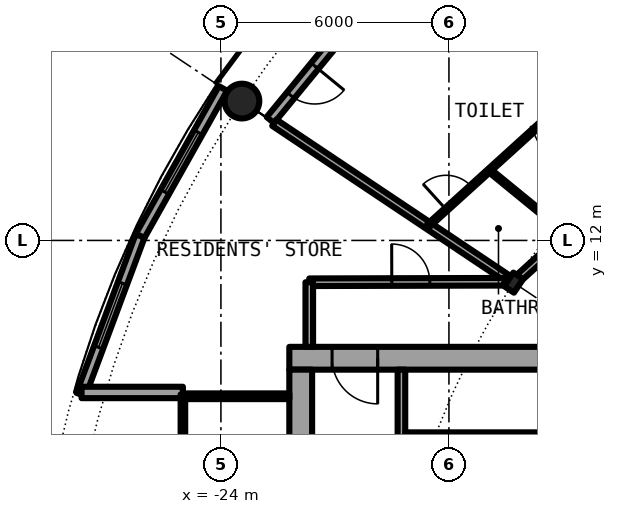
"""IFC4 building model, lengths in metres.
Left out: names, types, materials, properties, quantities, classifications, styles, units other than length and angle.
Written with IfcOpenShell. Run it as: python <this file> out.ifc"""

import sys

from ifc_helpers import new_model, si_unit, direction, frame, frame_2d, origin, origin_2d, place, context, subcontext, project, spatial, rectangle, hollow_circle, i_section, extrude, element, fill, save


model = new_model("IFC4")
c1 = context("Model", 3, precision=1e-05, world=origin(), true_north=direction((0.0, 1.0)))
c2 = subcontext(c1, "Body", "Model", "MODEL_VIEW")
j1 = project(units=[si_unit("LENGTHUNIT", "METRE"), si_unit("PLANEANGLEUNIT", "RADIAN")], contexts=[c1])
p1 = place(None, origin())
s1 = spatial("IfcSite", under=j1, at=p1, CompositionType="ELEMENT")
p2 = place(p1, origin())
s2 = spatial("IfcBuilding", under=s1, at=p2, CompositionType="ELEMENT")
p3 = place(p2, frame((0.0, 0.0, 129.95)))
s3 = spatial("IfcBuildingStorey", under=s2, at=p3, CompositionType="ELEMENT", Elevation=129.95)
p4 = place(p3, frame((-23.448, 15.667, 0.0), z_axis=(0.0, 0.0, 1.0), x_axis=(1.0, 0.0, 0.0)))
e1 = element("IfcColumn", 1, at=p4, inside=s3, PredefinedType="COLUMN", context=c2, shape_type="SweptSolid", body=[
    extrude(hollow_circle(Radius=0.457, WallThickness=0.04, at=origin_2d()), origin(), (0.0, 0.0, 1.0), 3.05),
])
p5 = place(p3, frame((-16.297, 10.889, 0.0), z_axis=(0.0, 0.0, 1.0), x_axis=(-0.831469612303, 0.55557023302, 0.0)))
e2 = element("IfcColumn", 2, at=p5, inside=s3, PredefinedType="COLUMN", context=c2, shape_type="SweptSolid", body=[
    extrude(i_section(OverallWidth=0.307, OverallDepth=0.432, WebThickness=0.021, FlangeThickness=0.04, FilletRadius=0.027, at=origin_2d()), origin(), (0.0, 0.0, 1.0), 3.05),
])
p6 = place(p3, frame((-19.304, 19.304, 0.0), z_axis=(0.0, 0.0, 1.0), x_axis=(-0.634382322723, -0.773019449054, 0.0)))
e3 = element("IfcWall", 3, at=p6, inside=s3, PredefinedType="SOLIDWALL", context=c2, shape_type="SweptSolid", body=[
    extrude(rectangle(XDim=5.352, YDim=0.25, at=frame_2d((2.676, 0.0))), origin(), (0.0, 0.0, 1.0), 2.7),
])
p7 = place(p6, frame((0.441, 0.0, 0.3)))
e4 = element("IfcOpeningElement", 4, at=p7, cuts=e3, PredefinedType="OPENING", context=c2, shape_type="SweptSolid", body=[
    extrude(rectangle(XDim=1.8, YDim=2.1, at=frame_2d((0.9, 1.05))), frame((0.0, 0.135, 0.0), z_axis=(0.0, -1.0, 0.0), x_axis=(1.0, 0.0, 0.0)), (0.0, 0.0, 1.0), 0.27),
])
p8 = place(p6, frame((3.51, 0.0, 0.0)))
e5 = element("IfcOpeningElement", 5, at=p8, cuts=e3, PredefinedType="OPENING", context=c2, shape_type="SweptSolid", body=[
    extrude(rectangle(XDim=1.0, YDim=2.2, at=frame_2d((0.5, 1.1))), frame((0.0, 0.135, 0.0), z_axis=(0.0, -1.0, 0.0), x_axis=(1.0, 0.0, 0.0)), (0.0, 0.0, 1.0), 0.27),
])
p9 = place(p3, frame((-23.946, 16.0, 0.0), z_axis=(0.0, 0.0, 1.0), x_axis=(-0.489696356642, -0.871893042919, 0.0)))
e6 = element("IfcWall", 6, at=p9, inside=s3, PredefinedType="SOLIDWALL", context=c2, shape_type="SweptSolid", body=[
    extrude(rectangle(XDim=4.454, YDim=0.25, at=frame_2d((2.227, 0.0))), origin(), (0.0, 0.0, 1.0), 2.7),
])
p10 = place(p9, frame((1.327, 0.0, 0.3)))
e7 = element("IfcOpeningElement", 7, at=p10, cuts=e6, PredefinedType="OPENING", context=c2, shape_type="SweptSolid", body=[
    extrude(rectangle(XDim=1.8, YDim=2.1, at=frame_2d((0.9, 1.05))), frame((0.0, 0.135, 0.0), z_axis=(0.0, -1.0, 0.0), x_axis=(1.0, 0.0, 0.0)), (0.0, 0.0, 1.0), 0.27),
])
p11 = place(p3, frame((-26.127, 12.117, 0.0), z_axis=(0.0, 0.0, 1.0), x_axis=(-0.349247811493, -0.937030397675, 0.0)))
e8 = element("IfcWall", 8, at=p11, inside=s3, PredefinedType="SOLIDWALL", context=c2, shape_type="SweptSolid", body=[
    extrude(rectangle(XDim=4.452, YDim=0.25, at=frame_2d((2.226, 0.0))), origin(), (0.0, 0.0, 1.0), 2.7),
])
p12 = place(p11, frame((1.327, 0.0, 0.3)))
e9 = element("IfcOpeningElement", 9, at=p12, cuts=e8, PredefinedType="OPENING", context=c2, shape_type="SweptSolid", body=[
    extrude(rectangle(XDim=1.8, YDim=2.1, at=frame_2d((0.9, 1.05))), frame((0.0, 0.135, 0.0), z_axis=(0.0, -1.0, 0.0), x_axis=(1.0, 0.0, 0.0)), (0.0, 0.0, 1.0), 0.27),
])
p13 = place(p3, frame((-25.0, 8.0, 0.0), z_axis=(0.0, 0.0, 1.0), x_axis=(-1.0, 0.0, 0.0)))
e10 = element("IfcWall", 10, at=p13, inside=s3, PredefinedType="SOLIDWALL", context=c2, shape_type="SweptSolid", body=[
    extrude(rectangle(XDim=2.667, YDim=0.3, at=frame_2d((1.333, 0.0))), origin(), (0.0, 0.0, 1.0), 2.7),
])
p14 = place(p3, frame((-8.4, 8.9, 0.0), z_axis=(0.0, 0.0, 1.0), x_axis=(-1.0, 0.0, 0.0)))
e11 = element("IfcWall", 11, at=p14, inside=s3, PredefinedType="SHEAR", context=c2, shape_type="SweptSolid", body=[
    extrude(rectangle(XDim=13.8, YDim=0.6, at=frame_2d((6.9, 0.0))), origin(), (0.0, 0.0, 1.0), 3.05),
])
p15 = place(p14, frame((11.475, 0.0, 0.0)))
e12 = element("IfcOpeningElement", 12, at=p15, cuts=e11, PredefinedType="OPENING", context=c2, shape_type="SweptSolid", body=[
    extrude(rectangle(XDim=1.2, YDim=2.3, at=frame_2d((0.6, 1.15))), frame((0.0, 0.31, 0.0), z_axis=(0.0, -1.0, 0.0), x_axis=(1.0, 0.0, 0.0)), (0.0, 0.0, 1.0), 0.62),
])
p16 = place(p3, frame((-21.9, -8.6, 0.0), z_axis=(0.0, 0.0, 1.0), x_axis=(0.0, 1.0, 0.0)))
e13 = element("IfcWall", 13, at=p16, inside=s3, PredefinedType="SHEAR", context=c2, shape_type="SweptSolid", body=[
    extrude(rectangle(XDim=17.2, YDim=0.6, at=frame_2d((8.6, 0.0))), origin(), (0.0, 0.0, 1.0), 3.05),
])
p17 = place(p16, frame((7.7, 0.0, 0.0)))
e14 = element("IfcOpeningElement", 14, at=p17, cuts=e13, PredefinedType="OPENING", context=c2, shape_type="SweptSolid", body=[
    extrude(rectangle(XDim=1.8, YDim=2.3, at=frame_2d((0.9, 1.15))), frame((0.0, 0.31, 0.0), z_axis=(0.0, -1.0, 0.0), x_axis=(1.0, 0.0, 0.0)), (0.0, 0.0, 1.0), 0.62),
])
p18 = place(p3, frame((-19.25, 8.6, 0.0), z_axis=(0.0, 0.0, 1.0), x_axis=(0.0, -1.0, 0.0)))
e15 = element("IfcWall", 15, at=p18, inside=s3, PredefinedType="SOLIDWALL", context=c2, shape_type="SweptSolid", body=[
    extrude(rectangle(XDim=7.025, YDim=0.2, at=frame_2d((3.513, 0.0))), origin(), (0.0, 0.0, 1.0), 2.7),
])
p19 = place(p18, frame((2.35, 0.0, 0.0)))
e16 = element("IfcOpeningElement", 16, at=p19, cuts=e15, PredefinedType="OPENING", context=c2, shape_type="SweptSolid", body=[
    extrude(rectangle(XDim=1.1, YDim=2.3, at=frame_2d((0.55, 1.15))), frame((0.0, 0.11, 0.0), z_axis=(0.0, -1.0, 0.0), x_axis=(1.0, 0.0, 0.0)), (0.0, 0.0, 1.0), 0.22),
])
p20 = place(p3, frame((-15.45, 6.875, 0.0), z_axis=(0.0, 0.0, 1.0), x_axis=(-1.0, 0.0, 0.0)))
e17 = element("IfcWall", 17, at=p20, inside=s3, PredefinedType="PARTITIONING", context=c2, shape_type="SweptSolid", body=[
    extrude(rectangle(XDim=3.7, YDim=0.15, at=frame_2d((1.85, 0.0))), origin(), (0.0, 0.0, 1.0), 2.7),
])
p21 = place(p20, frame((1.4, 0.0, 0.0)))
e18 = element("IfcOpeningElement", 18, at=p21, cuts=e17, PredefinedType="OPENING", context=c2, shape_type="SweptSolid", body=[
    extrude(rectangle(XDim=0.9, YDim=2.3, at=frame_2d((0.45, 1.15))), frame((0.0, 0.085, 0.0), z_axis=(0.0, -1.0, 0.0), x_axis=(1.0, 0.0, 0.0)), (0.0, 0.0, 1.0), 0.17),
])
p22 = place(p3, frame((-22.2, 7.9, 0.0), z_axis=(0.0, 0.0, 1.0), x_axis=(-1.0, 0.0, 0.0)))
e19 = element("IfcWall", 19, at=p22, inside=s3, PredefinedType="PARTITIONING", context=c2, shape_type="SweptSolid", body=[
    extrude(rectangle(XDim=2.74, YDim=0.15, at=frame_2d((1.37, 0.0))), origin(), (0.0, 0.0, 1.0), 2.7),
])
p23 = place(p3, frame((-25.0, 7.95, 0.0), z_axis=(0.0, 0.0, 1.0), x_axis=(0.0, -1.0, 0.0)))
e20 = element("IfcWall", 20, at=p23, inside=s3, PredefinedType="PARTITIONING", context=c2, shape_type="SweptSolid", body=[
    extrude(rectangle(XDim=15.9, YDim=0.12, at=frame_2d((7.95, 0.0))), origin(), (0.0, 0.0, 1.0), 2.7),
])
p24 = place(p23, frame((0.95, 0.0, 0.1)))
e21 = element("IfcOpeningElement", 21, at=p24, cuts=e20, PredefinedType="OPENING", context=c2, shape_type="SweptSolid", body=[
    extrude(rectangle(XDim=14.0, YDim=2.35, at=frame_2d((7.0, 1.175))), frame((0.0, 0.07, 0.0), z_axis=(0.0, -1.0, 0.0), x_axis=(1.0, 0.0, 0.0)), (0.0, 0.0, 1.0), 0.14),
])
p25 = place(p3, frame((-22.595, 15.098, 0.0), z_axis=(0.0, 0.0, 1.0), x_axis=(0.831406593008, -0.555664536482, 0.0)))
e22 = element("IfcWall", 22, at=p25, inside=s3, PredefinedType="PARTITIONING", context=c2, shape_type="SweptSolid", body=[
    extrude(rectangle(XDim=7.358, YDim=0.2, at=frame_2d((3.679, 0.0))), origin(), (0.0, 0.0, 1.0), 2.7),
])
p26 = place(p3, frame((-17.221, 21.022, 0.0), z_axis=(0.0, 0.0, 1.0), x_axis=(0.633735868108, -0.773549513266, 0.0)))
e23 = element("IfcWall", 23, at=p26, inside=s3, PredefinedType="PARTITIONING", context=c2, shape_type="SweptSolid", body=[
    extrude(rectangle(XDim=8.139, YDim=0.1, at=frame_2d((4.069, 0.0))), origin(), (0.0, 0.0, 1.0), 2.7),
])
p27 = place(p26, frame((6.378, 0.0, 0.0)))
e24 = element("IfcOpeningElement", 24, at=p27, cuts=e23, PredefinedType="OPENING", context=c2, shape_type="SweptSolid", body=[
    extrude(rectangle(XDim=0.9, YDim=2.3, at=frame_2d((0.45, 1.15))), frame((0.0, 0.06, 0.0), z_axis=(0.0, -1.0, 0.0), x_axis=(1.0, 0.0, 0.0)), (0.0, 0.0, 1.0), 0.12),
])
p28 = place(p26, frame((2.308, 0.0, 0.0)))
e25 = element("IfcOpeningElement", 25, at=p28, cuts=e23, PredefinedType="OPENING", context=c2, shape_type="SweptSolid", body=[
    extrude(rectangle(XDim=0.9, YDim=2.3, at=frame_2d((0.45, 1.15))), frame((0.0, 0.06, 0.0), z_axis=(0.0, -1.0, 0.0), x_axis=(1.0, 0.0, 0.0)), (0.0, 0.0, 1.0), 0.12),
])
p29 = place(p3, frame((-16.936, 13.845, 0.0), z_axis=(0.0, 0.0, 1.0), x_axis=(0.774162545943, -0.632986850147, 0.0)))
e26 = element("IfcWall", 26, at=p29, inside=s3, PredefinedType="PARTITIONING", context=c2, shape_type="SweptSolid", body=[
    extrude(rectangle(XDim=2.649, YDim=0.1, at=frame_2d((1.325, 0.0))), origin(), (0.0, 0.0, 1.0), 2.7),
])
p30 = place(p3, frame((-21.675, 10.9, 0.0), z_axis=(0.0, 0.0, 1.0), x_axis=(0.99999670426, 0.002567385634, 0.0)))
e27 = element("IfcWall", 27, at=p30, inside=s3, PredefinedType="PARTITIONING", context=c2, shape_type="SweptSolid", body=[
    extrude(rectangle(XDim=5.135, YDim=0.2, at=frame_2d((2.567, 0.0))), origin(), (0.0, 0.0, 1.0), 2.7),
])
p31 = place(p30, frame((2.171, 0.0, 0.0)))
e28 = element("IfcOpeningElement", 28, at=p31, cuts=e27, PredefinedType="OPENING", context=c2, shape_type="SweptSolid", body=[
    extrude(rectangle(XDim=1.0, YDim=2.3, at=frame_2d((0.5, 1.15))), frame((0.0, 0.11, 0.0), z_axis=(0.0, -1.0, 0.0), x_axis=(1.0, 0.0, 0.0)), (0.0, 0.0, 1.0), 0.22),
])
p32 = place(p3, frame((-16.179, 10.995, 0.0), z_axis=(0.0, 0.0, 1.0), x_axis=(0.74092608219, 0.671586584687, 0.0)))
e29 = element("IfcWall", 29, at=p32, inside=s3, PredefinedType="PARTITIONING", context=c2, shape_type="SweptSolid", body=[
    extrude(rectangle(XDim=1.746, YDim=0.2, at=frame_2d((0.873, 0.0))), origin(), (0.0, 0.0, 1.0), 2.39),
])
p33 = place(p3, frame((-18.54, 12.392, 0.0), z_axis=(0.0, 0.0, 1.0), x_axis=(0.741109646243, 0.671384012504, 0.0)))
e30 = element("IfcWall", 30, at=p33, inside=s3, PredefinedType="PARTITIONING", context=c2, shape_type="SweptSolid", body=[
    extrude(rectangle(XDim=4.331, YDim=0.1, at=frame_2d((2.166, 0.0))), origin(), (0.0, 0.0, 1.0), 2.7),
])
p34 = place(p33, frame((0.629, 0.0, 0.0)))
e31 = element("IfcOpeningElement", 31, at=p34, cuts=e30, PredefinedType="OPENING", context=c2, shape_type="SweptSolid", body=[
    extrude(rectangle(XDim=0.9, YDim=2.3, at=frame_2d((0.45, 1.15))), frame((0.0, 0.06, 0.0), z_axis=(0.0, -1.0, 0.0), x_axis=(1.0, 0.0, 0.0)), (0.0, 0.0, 1.0), 0.12),
])
p35 = place(p3, frame((-21.675, 9.2, 0.0), z_axis=(0.0, 0.0, 1.0), x_axis=(0.0, 1.0, 0.0)))
e32 = element("IfcWall", 32, at=p35, inside=s3, PredefinedType="PARTITIONING", context=c2, shape_type="SweptSolid", body=[
    extrude(rectangle(XDim=1.7, YDim=0.2, at=frame_2d((0.85, 0.0))), origin(), (0.0, 0.0, 1.0), 2.7),
])
p36 = place(p8, origin())
e33 = element("IfcDoor", 33, at=p36, inside=s3, OperationType="SINGLE_SWING_LEFT", PredefinedType="DOOR", context=c2, shape_type="SweptSolid", body=[
    extrude(rectangle(XDim=1.0, YDim=2.2, at=frame_2d((0.5, 1.1))), frame((0.0, 0.025, 0.0), z_axis=(0.0, -1.0, 0.0), x_axis=(1.0, 0.0, 0.0)), (0.0, 0.0, 1.0), 0.05),
])
fill(e5, e33)
p37 = place(p10, origin())
e34 = element("IfcWindow", 34, at=p37, inside=s3, PartitioningType="SINGLE_PANEL", PredefinedType="WINDOW", context=c2, shape_type="SweptSolid", body=[
    extrude(rectangle(XDim=1.8, YDim=2.1, at=frame_2d((0.9, 1.05))), frame((0.0, 0.03, 0.0), z_axis=(0.0, -1.0, 0.0), x_axis=(1.0, 0.0, 0.0)), (0.0, 0.0, 1.0), 0.06),
])
fill(e7, e34)
p38 = place(p12, origin())
e35 = element("IfcWindow", 35, at=p38, inside=s3, PartitioningType="SINGLE_PANEL", PredefinedType="WINDOW", context=c2, shape_type="SweptSolid", body=[
    extrude(rectangle(XDim=1.8, YDim=2.1, at=frame_2d((0.9, 1.05))), frame((0.0, 0.03, 0.0), z_axis=(0.0, -1.0, 0.0), x_axis=(1.0, 0.0, 0.0)), (0.0, 0.0, 1.0), 0.06),
])
fill(e9, e35)
p39 = place(p21, origin())
e36 = element("IfcDoor", 36, at=p39, inside=s3, OperationType="SINGLE_SWING_LEFT", PredefinedType="DOOR", context=c2, shape_type="SweptSolid", body=[
    extrude(rectangle(XDim=0.9, YDim=2.3, at=frame_2d((0.45, 1.15))), frame((0.0, 0.025, 0.0), z_axis=(0.0, -1.0, 0.0), x_axis=(1.0, 0.0, 0.0)), (0.0, 0.0, 1.0), 0.05),
])
fill(e18, e36)
p40 = place(p15, origin())
e37 = element("IfcDoor", 37, at=p40, inside=s3, OperationType="SINGLE_SWING_LEFT", PredefinedType="DOOR", context=c2, shape_type="SweptSolid", body=[
    extrude(rectangle(XDim=1.2, YDim=2.3, at=frame_2d((0.6, 1.15))), frame((0.0, 0.025, 0.0), z_axis=(0.0, -1.0, 0.0), x_axis=(1.0, 0.0, 0.0)), (0.0, 0.0, 1.0), 0.05),
])
fill(e12, e37)
p41 = place(p24, origin())
e38 = element("IfcWindow", 38, at=p41, inside=s3, PartitioningType="SINGLE_PANEL", PredefinedType="WINDOW", context=c2, shape_type="SweptSolid", body=[
    extrude(rectangle(XDim=14.0, YDim=2.35, at=frame_2d((7.0, 1.175))), frame((0.0, 0.03, 0.0), z_axis=(0.0, -1.0, 0.0), x_axis=(1.0, 0.0, 0.0)), (0.0, 0.0, 1.0), 0.06),
])
fill(e21, e38)
p42 = place(p34, origin())
e39 = element("IfcDoor", 39, at=p42, inside=s3, OperationType="SINGLE_SWING_LEFT", PredefinedType="DOOR", context=c2, shape_type="SweptSolid", body=[
    extrude(rectangle(XDim=0.9, YDim=2.3, at=frame_2d((0.45, 1.15))), frame((0.0, 0.025, 0.0), z_axis=(0.0, -1.0, 0.0), x_axis=(1.0, 0.0, 0.0)), (0.0, 0.0, 1.0), 0.05),
])
fill(e31, e39)
p43 = place(p31, origin())
e40 = element("IfcDoor", 40, at=p43, inside=s3, OperationType="SINGLE_SWING_RIGHT", PredefinedType="DOOR", context=c2, shape_type="SweptSolid", body=[
    extrude(rectangle(XDim=1.0, YDim=2.3, at=frame_2d((0.5, 1.15))), frame((0.0, 0.025, 0.0), z_axis=(0.0, -1.0, 0.0), x_axis=(1.0, 0.0, 0.0)), (0.0, 0.0, 1.0), 0.05),
])
fill(e28, e40)
save(model, sys.argv[1])
